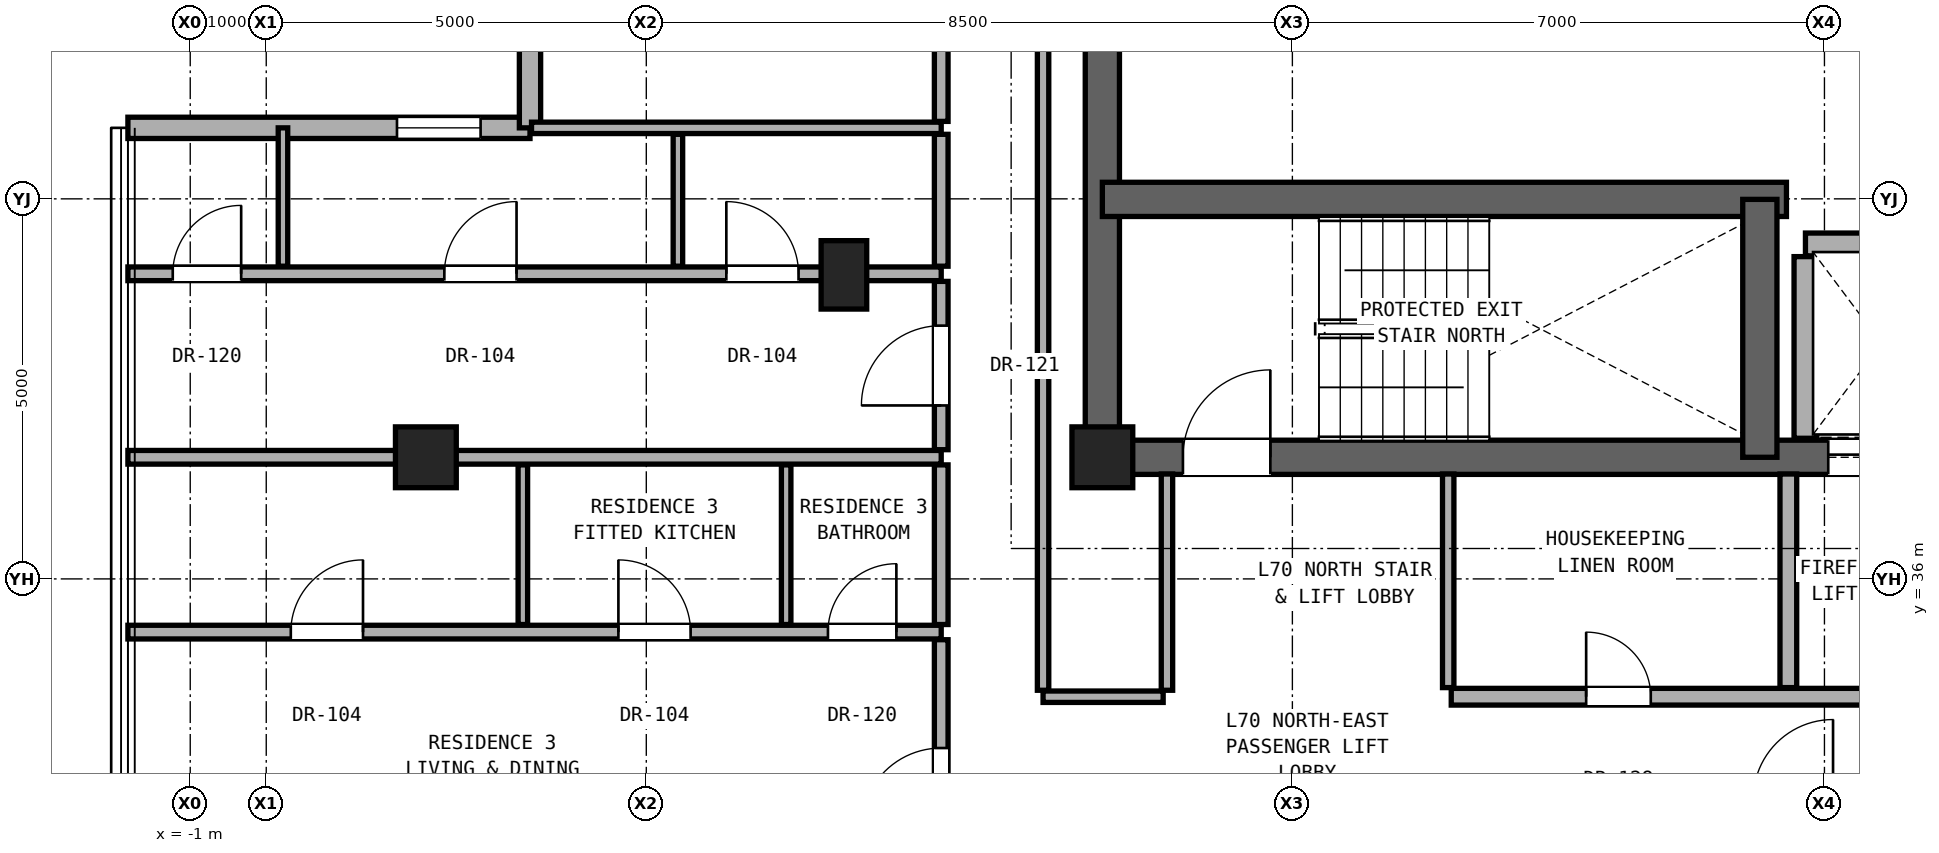
"""IFC4 building model, lengths in metres.
Left out: names, types, materials, properties, quantities, classifications, styles, units other than length and angle.
Written with IfcOpenShell. Run it as: python <this file> out.ifc"""

import sys

from ifc_helpers import new_model, si_unit, direction, frame, frame_2d, origin, origin_2d, place, context, subcontext, project, spatial, rectangle, hollow_rectangle, extrude, element, fill, save


model = new_model("IFC4")
c1 = context("Model", 3, precision=1e-05, world=origin(), true_north=direction((0.0, 1.0)))
c2 = subcontext(c1, "Body", "Model", "MODEL_VIEW")
j1 = project(units=[si_unit("LENGTHUNIT", "METRE"), si_unit("PLANEANGLEUNIT", "RADIAN")], contexts=[c1])
p1 = place(None, origin())
s1 = spatial("IfcSite", under=j1, at=p1, CompositionType="ELEMENT")
p2 = place(p1, origin())
s2 = spatial("IfcBuilding", under=s1, at=p2, CompositionType="ELEMENT")
p3 = place(p2, frame((0.0, 0.0, 245.8)))
s3 = spatial("IfcBuildingStorey", under=s2, at=p3, CompositionType="ELEMENT", Elevation=245.8)
p4 = place(p3, frame((11.0, 37.6, 0.0), z_axis=(0.0, 0.0, 1.0), x_axis=(1.0, 0.0, 0.0)))
e1 = element("IfcColumn", 1, at=p4, inside=s3, PredefinedType="COLUMN", context=c2, shape_type="SweptSolid", body=[
    extrude(rectangle(XDim=0.8, YDim=0.8, at=origin_2d()), origin(), (0.0, 0.0, 1.0), 3.3),
])
p5 = place(p3, frame((2.1, 37.6, 0.0), z_axis=(0.0, 0.0, 1.0), x_axis=(1.0, 0.0, 0.0)))
e2 = element("IfcColumn", 2, at=p5, inside=s3, PredefinedType="COLUMN", context=c2, shape_type="SweptSolid", body=[
    extrude(hollow_rectangle(XDim=0.8, YDim=0.8, WallThickness=0.045, at=origin_2d()), origin(), (0.0, 0.0, 1.0), 3.3),
])
p6 = place(p3, frame((7.6, 40.0, 0.0), z_axis=(0.0, 0.0, 1.0), x_axis=(1.0, 0.0, 0.0)))
e3 = element("IfcColumn", 3, at=p6, inside=s3, PredefinedType="PILASTER", context=c2, shape_type="SweptSolid", body=[
    extrude(rectangle(XDim=0.6, YDim=0.9, at=origin_2d()), origin(), (0.0, 0.0, 1.0), 3.3),
])
p7 = place(p3, frame((11.0, 37.6, 0.0), z_axis=(0.0, 0.0, 1.0), x_axis=(0.0, 1.0, 0.0)))
e4 = element("IfcWall", 4, at=p7, inside=s3, PredefinedType="SHEAR", context=c2, shape_type="SweptSolid", body=[
    extrude(rectangle(XDim=6.0, YDim=0.45, at=frame_2d((3.0, 0.0))), origin(), (0.0, 0.0, 1.0), 3.1),
])
p8 = place(p3, frame((11.0, 37.6, 0.0), z_axis=(0.0, 0.0, 1.0), x_axis=(1.0, 0.0, 0.0)))
e5 = element("IfcWall", 5, at=p8, inside=s3, PredefinedType="SHEAR", context=c2, shape_type="SweptSolid", body=[
    extrude(rectangle(XDim=19.0, YDim=0.45, at=frame_2d((9.5, 0.0))), origin(), (0.0, 0.0, 1.0), 3.1),
])
p9 = place(p8, frame((1.06, 0.0, 0.0)))
e6 = element("IfcOpeningElement", 6, at=p9, cuts=e5, PredefinedType="OPENING", context=c2, shape_type="SweptSolid", body=[
    extrude(rectangle(XDim=1.15, YDim=2.2, at=frame_2d((0.575, 1.1))), frame((0.0, 0.235, 0.0), z_axis=(0.0, -1.0, 0.0), x_axis=(1.0, 0.0, 0.0)), (0.0, 0.0, 1.0), 0.47),
])
p10 = place(p8, frame((9.55, 0.0, 0.0)))
e7 = element("IfcOpeningElement", 7, at=p10, cuts=e5, PredefinedType="OPENING", context=c2, shape_type="SweptSolid", body=[
    extrude(rectangle(XDim=1.4, YDim=2.35, at=frame_2d((0.7, 1.175))), frame((0.0, 0.235, 0.0), z_axis=(0.0, -1.0, 0.0), x_axis=(1.0, 0.0, 0.0)), (0.0, 0.0, 1.0), 0.47),
])
p11 = place(p8, frame((11.95, 0.0, 0.0)))
e8 = element("IfcOpeningElement", 8, at=p11, cuts=e5, PredefinedType="OPENING", context=c2, shape_type="SweptSolid", body=[
    extrude(rectangle(XDim=1.4, YDim=2.35, at=frame_2d((0.7, 1.175))), frame((0.0, 0.235, 0.0), z_axis=(0.0, -1.0, 0.0), x_axis=(1.0, 0.0, 0.0)), (0.0, 0.0, 1.0), 0.47),
])
p12 = place(p3, frame((11.0, 40.993, 0.0), z_axis=(0.0, 0.0, 1.0), x_axis=(1.0, 0.0, 0.0)))
e9 = element("IfcWall", 9, at=p12, inside=s3, PredefinedType="SHEAR", context=c2, shape_type="SweptSolid", body=[
    extrude(rectangle(XDim=9.0, YDim=0.45, at=frame_2d((4.5, 0.0))), origin(), (0.0, 0.0, 1.0), 3.1),
])
p13 = place(p3, frame((19.65, 37.6, 0.0), z_axis=(0.0, 0.0, 1.0), x_axis=(0.0, 1.0, 0.0)))
e10 = element("IfcWall", 10, at=p13, inside=s3, PredefinedType="SHEAR", context=c2, shape_type="SweptSolid", body=[
    extrude(rectangle(XDim=3.393, YDim=0.45, at=frame_2d((1.696, 0.0))), origin(), (0.0, 0.0, 1.0), 3.1),
])
p14 = place(p3, frame((3.47, 41.934, 0.0), z_axis=(0.0, 0.0, 1.0), x_axis=(-1.0, 0.0, 0.0)))
e11 = element("IfcWall", 11, at=p14, inside=s3, PredefinedType="SOLIDWALL", context=c2, shape_type="SweptSolid", body=[
    extrude(rectangle(XDim=5.29, YDim=0.28, at=frame_2d((2.645, 0.0))), origin(), (0.0, 0.0, 1.0), 3.08),
])
p15 = place(p14, frame((0.65, 0.0, 0.85)))
e12 = element("IfcOpeningElement", 12, at=p15, cuts=e11, PredefinedType="OPENING", context=c2, shape_type="SweptSolid", body=[
    extrude(rectangle(XDim=1.1, YDim=2.0, at=frame_2d((0.55, 1.0))), frame((0.0, 0.15, 0.0), z_axis=(0.0, -1.0, 0.0), x_axis=(1.0, 0.0, 0.0)), (0.0, 0.0, 1.0), 0.3),
])
p16 = place(p3, frame((3.47, 47.224, 0.0), z_axis=(0.0, 0.0, 1.0), x_axis=(0.0, -1.0, 0.0)))
e13 = element("IfcWall", 13, at=p16, inside=s3, PredefinedType="SOLIDWALL", context=c2, shape_type="SweptSolid", body=[
    extrude(rectangle(XDim=5.29, YDim=0.28, at=frame_2d((2.645, 0.0))), origin(), (0.0, 0.0, 1.0), 3.08),
])
p17 = place(p3, frame((10.22, 34.45, 0.0), z_axis=(0.0, 0.0, 1.0), x_axis=(1.0, 0.0, 0.0)))
e14 = element("IfcWall", 14, at=p17, inside=s3, PredefinedType="PARTITIONING", context=c2, shape_type="SweptSolid", body=[
    extrude(rectangle(XDim=1.58, YDim=0.15, at=frame_2d((0.79, 0.0))), origin(), (0.0, 0.0, 1.0), 2.236),
])
p18 = place(p3, frame((15.59, 34.45, 0.0), z_axis=(0.0, 0.0, 1.0), x_axis=(1.0, 0.0, 0.0)))
e15 = element("IfcWall", 15, at=p18, inside=s3, PredefinedType="SOLIDWALL", context=c2, shape_type="SweptSolid", body=[
    extrude(rectangle(XDim=15.19, YDim=0.22, at=frame_2d((7.595, 0.0))), origin(), (0.0, 0.0, 1.0), 2.236),
])
p19 = place(p18, frame((6.435, 0.0, 0.0)))
e16 = element("IfcOpeningElement", 16, at=p19, cuts=e15, PredefinedType="OPENING", context=c2, shape_type="SweptSolid", body=[
    extrude(rectangle(XDim=0.85, YDim=2.01, at=frame_2d((0.425, 1.005))), frame((0.0, 0.12, 0.0), z_axis=(0.0, -1.0, 0.0), x_axis=(1.0, 0.0, 0.0)), (0.0, 0.0, 1.0), 0.24),
])
p20 = place(p18, frame((11.085, 0.0, 0.0)))
e17 = element("IfcOpeningElement", 17, at=p20, cuts=e15, PredefinedType="OPENING", context=c2, shape_type="SweptSolid", body=[
    extrude(rectangle(XDim=0.95, YDim=2.15, at=frame_2d((0.475, 1.075))), frame((0.0, 0.12, 0.0), z_axis=(0.0, -1.0, 0.0), x_axis=(1.0, 0.0, 0.0)), (0.0, 0.0, 1.0), 0.24),
])
p21 = place(p18, frame((1.775, 0.0, 0.0)))
e18 = element("IfcOpeningElement", 18, at=p21, cuts=e15, PredefinedType="OPENING", context=c2, shape_type="SweptSolid", body=[
    extrude(rectangle(XDim=0.85, YDim=2.01, at=frame_2d((0.425, 1.005))), frame((0.0, 0.12, 0.0), z_axis=(0.0, -1.0, 0.0), x_axis=(1.0, 0.0, 0.0)), (0.0, 0.0, 1.0), 0.24),
])
p22 = place(p3, frame((-1.82, 35.3, 0.0), z_axis=(0.0, 0.0, 1.0), x_axis=(1.0, 0.0, 0.0)))
e19 = element("IfcWall", 19, at=p22, inside=s3, PredefinedType="PARTITIONING", context=c2, shape_type="SweptSolid", body=[
    extrude(rectangle(XDim=10.7, YDim=0.18, at=frame_2d((5.35, 0.0))), origin(), (0.0, 0.0, 1.0), 2.319),
])
p23 = place(p22, frame((2.143, 0.0, 0.0)))
e20 = element("IfcOpeningElement", 20, at=p23, cuts=e19, PredefinedType="OPENING", context=c2, shape_type="SweptSolid", body=[
    extrude(rectangle(XDim=0.95, YDim=2.15, at=frame_2d((0.475, 1.075))), frame((0.0, 0.1, 0.0), z_axis=(0.0, -1.0, 0.0), x_axis=(1.0, 0.0, 0.0)), (0.0, 0.0, 1.0), 0.2),
])
p24 = place(p22, frame((6.453, 0.0, 0.0)))
e21 = element("IfcOpeningElement", 21, at=p24, cuts=e19, PredefinedType="OPENING", context=c2, shape_type="SweptSolid", body=[
    extrude(rectangle(XDim=0.95, YDim=2.15, at=frame_2d((0.475, 1.075))), frame((0.0, 0.1, 0.0), z_axis=(0.0, -1.0, 0.0), x_axis=(1.0, 0.0, 0.0)), (0.0, 0.0, 1.0), 0.2),
])
p25 = place(p22, frame((9.21, 0.0, 0.0)))
e22 = element("IfcOpeningElement", 22, at=p25, cuts=e19, PredefinedType="OPENING", context=c2, shape_type="SweptSolid", body=[
    extrude(rectangle(XDim=0.9, YDim=2.1, at=frame_2d((0.45, 1.05))), frame((0.0, 0.1, 0.0), z_axis=(0.0, -1.0, 0.0), x_axis=(1.0, 0.0, 0.0)), (0.0, 0.0, 1.0), 0.2),
])
p26 = place(p3, frame((-1.82, 37.6, 0.0), z_axis=(0.0, 0.0, 1.0), x_axis=(1.0, 0.0, 0.0)))
e23 = element("IfcWall", 23, at=p26, inside=s3, PredefinedType="PARTITIONING", context=c2, shape_type="SweptSolid", body=[
    extrude(rectangle(XDim=10.7, YDim=0.18, at=frame_2d((5.35, 0.0))), origin(), (0.0, 0.0, 1.0), 2.319),
])
p27 = place(p3, frame((-1.82, 40.014, 0.0), z_axis=(0.0, 0.0, 1.0), x_axis=(1.0, 0.0, 0.0)))
e24 = element("IfcWall", 24, at=p27, inside=s3, PredefinedType="PARTITIONING", context=c2, shape_type="SweptSolid", body=[
    extrude(rectangle(XDim=10.7, YDim=0.18, at=frame_2d((5.35, 0.0))), origin(), (0.0, 0.0, 1.0), 2.543),
])
p28 = place(p27, frame((4.163, 0.0, 0.0)))
e25 = element("IfcOpeningElement", 25, at=p28, cuts=e24, PredefinedType="OPENING", context=c2, shape_type="SweptSolid", body=[
    extrude(rectangle(XDim=0.95, YDim=2.15, at=frame_2d((0.475, 1.075))), frame((0.0, 0.1, 0.0), z_axis=(0.0, -1.0, 0.0), x_axis=(1.0, 0.0, 0.0)), (0.0, 0.0, 1.0), 0.2),
])
p29 = place(p27, frame((7.873, 0.0, 0.0)))
e26 = element("IfcOpeningElement", 26, at=p29, cuts=e24, PredefinedType="OPENING", context=c2, shape_type="SweptSolid", body=[
    extrude(rectangle(XDim=0.95, YDim=2.15, at=frame_2d((0.475, 1.075))), frame((0.0, 0.1, 0.0), z_axis=(0.0, -1.0, 0.0), x_axis=(1.0, 0.0, 0.0)), (0.0, 0.0, 1.0), 0.2),
])
p30 = place(p27, frame((0.59, 0.0, 0.0)))
e27 = element("IfcOpeningElement", 27, at=p30, cuts=e24, PredefinedType="OPENING", context=c2, shape_type="SweptSolid", body=[
    extrude(rectangle(XDim=0.9, YDim=2.1, at=frame_2d((0.45, 1.05))), frame((0.0, 0.1, 0.0), z_axis=(0.0, -1.0, 0.0), x_axis=(1.0, 0.0, 0.0)), (0.0, 0.0, 1.0), 0.2),
])
p31 = place(p3, frame((20.25, 40.4, 0.0), z_axis=(0.0, 0.0, 1.0), x_axis=(1.0, 0.0, 0.0)))
e28 = element("IfcWall", 28, at=p31, inside=s3, PredefinedType="SOLIDWALL", context=c2, shape_type="SweptSolid", body=[
    extrude(rectangle(XDim=4.4, YDim=0.3, at=frame_2d((2.2, 0.0))), origin(), (0.0, 0.0, 1.0), 3.1),
])
p32 = place(p3, frame((3.49, 41.934, 0.0), z_axis=(0.0, 0.0, 1.0), x_axis=(1.0, 0.0, 0.0)))
e29 = element("IfcWall", 29, at=p32, inside=s3, PredefinedType="PARTITIONING", context=c2, shape_type="SweptSolid", body=[
    extrude(rectangle(XDim=5.39, YDim=0.15, at=frame_2d((2.695, 0.0))), origin(), (0.0, 0.0, 1.0), 3.1),
])
p33 = place(p3, frame((0.22, 40.114, 0.0), z_axis=(0.0, 0.0, 1.0), x_axis=(0.0, 1.0, 0.0)))
e30 = element("IfcWall", 30, at=p33, inside=s3, PredefinedType="PARTITIONING", context=c2, shape_type="SweptSolid", body=[
    extrude(rectangle(XDim=1.82, YDim=0.125, at=frame_2d((0.91, 0.0))), origin(), (0.0, 0.0, 1.0), 3.1),
])
p34 = place(p3, frame((3.376, 35.4, 0.0), z_axis=(0.0, 0.0, 1.0), x_axis=(0.0, 1.0, 0.0)))
e31 = element("IfcWall", 31, at=p34, inside=s3, PredefinedType="PARTITIONING", context=c2, shape_type="SweptSolid", body=[
    extrude(rectangle(XDim=2.1, YDim=0.125, at=frame_2d((1.05, 0.0))), origin(), (0.0, 0.0, 1.0), 2.492),
])
p35 = place(p3, frame((5.416, 40.114, 0.0), z_axis=(0.0, 0.0, 1.0), x_axis=(0.0, 1.0, 0.0)))
e32 = element("IfcWall", 32, at=p35, inside=s3, PredefinedType="PARTITIONING", context=c2, shape_type="SweptSolid", body=[
    extrude(rectangle(XDim=1.735, YDim=0.125, at=frame_2d((0.868, 0.0))), origin(), (0.0, 0.0, 1.0), 3.1),
])
p36 = place(p3, frame((6.84, 35.4, 0.0), z_axis=(0.0, 0.0, 1.0), x_axis=(0.0, 1.0, 0.0)))
e33 = element("IfcWall", 33, at=p36, inside=s3, PredefinedType="PARTITIONING", context=c2, shape_type="SweptSolid", body=[
    extrude(rectangle(XDim=2.1, YDim=0.125, at=frame_2d((1.05, 0.0))), origin(), (0.0, 0.0, 1.0), 2.492),
])
p37 = place(p3, frame((8.88, 31.3, 0.0), z_axis=(0.0, 0.0, 1.0), x_axis=(0.0, 1.0, 0.0)))
e34 = element("IfcWall", 34, at=p37, inside=s3, PredefinedType="PARTITIONING", context=c2, shape_type="SweptSolid", body=[
    extrude(rectangle(XDim=3.9, YDim=0.18, at=frame_2d((1.95, 0.0))), origin(), (0.0, 0.0, 1.0), 2.396),
])
p38 = place(p37, frame((1.425, 0.0, 0.0)))
e35 = element("IfcOpeningElement", 35, at=p38, cuts=e34, PredefinedType="OPENING", context=c2, shape_type="SweptSolid", body=[
    extrude(rectangle(XDim=1.05, YDim=2.2, at=frame_2d((0.525, 1.1))), frame((0.0, 0.1, 0.0), z_axis=(0.0, -1.0, 0.0), x_axis=(1.0, 0.0, 0.0)), (0.0, 0.0, 1.0), 0.2),
])
p39 = place(p3, frame((8.88, 35.4, 0.0), z_axis=(0.0, 0.0, 1.0), x_axis=(0.0, 1.0, 0.0)))
e36 = element("IfcWall", 36, at=p39, inside=s3, PredefinedType="PARTITIONING", context=c2, shape_type="SweptSolid", body=[
    extrude(rectangle(XDim=2.1, YDim=0.18, at=frame_2d((1.05, 0.0))), origin(), (0.0, 0.0, 1.0), 2.492),
])
p40 = place(p3, frame((8.88, 37.7, 0.0), z_axis=(0.0, 0.0, 1.0), x_axis=(0.0, 1.0, 0.0)))
e37 = element("IfcWall", 37, at=p40, inside=s3, PredefinedType="PARTITIONING", context=c2, shape_type="SweptSolid", body=[
    extrude(rectangle(XDim=2.214, YDim=0.18, at=frame_2d((1.107, 0.0))), origin(), (0.0, 0.0, 1.0), 2.492),
])
p41 = place(p40, frame((0.582, 0.0, 0.0)))
e38 = element("IfcOpeningElement", 38, at=p41, cuts=e37, PredefinedType="OPENING", context=c2, shape_type="SweptSolid", body=[
    extrude(rectangle(XDim=1.05, YDim=2.2, at=frame_2d((0.525, 1.1))), frame((0.0, 0.1, 0.0), z_axis=(0.0, -1.0, 0.0), x_axis=(1.0, 0.0, 0.0)), (0.0, 0.0, 1.0), 0.2),
])
p42 = place(p3, frame((8.88, 40.114, 0.0), z_axis=(0.0, 0.0, 1.0), x_axis=(0.0, 1.0, 0.0)))
e39 = element("IfcWall", 39, at=p42, inside=s3, PredefinedType="PARTITIONING", context=c2, shape_type="SweptSolid", body=[
    extrude(rectangle(XDim=1.735, YDim=0.18, at=frame_2d((0.868, 0.0))), origin(), (0.0, 0.0, 1.0), 3.1),
])
p43 = place(p3, frame((8.88, 42.019, 0.0), z_axis=(0.0, 0.0, 1.0), x_axis=(0.0, 1.0, 0.0)))
e40 = element("IfcWall", 40, at=p43, inside=s3, PredefinedType="PARTITIONING", context=c2, shape_type="SweptSolid", body=[
    extrude(rectangle(XDim=5.205, YDim=0.18, at=frame_2d((2.603, 0.0))), origin(), (0.0, 0.0, 1.0), 3.1),
])
p44 = place(p43, frame((2.127, 0.0, 0.0)))
e41 = element("IfcOpeningElement", 41, at=p44, cuts=e40, PredefinedType="OPENING", context=c2, shape_type="SweptSolid", body=[
    extrude(rectangle(XDim=0.95, YDim=2.15, at=frame_2d((0.475, 1.075))), frame((0.0, 0.1, 0.0), z_axis=(0.0, -1.0, 0.0), x_axis=(1.0, 0.0, 0.0)), (0.0, 0.0, 1.0), 0.2),
])
p45 = place(p3, frame((10.22, 34.535, 0.0), z_axis=(0.0, 0.0, 1.0), x_axis=(0.0, 1.0, 0.0)))
e42 = element("IfcWall", 42, at=p45, inside=s3, PredefinedType="PARTITIONING", context=c2, shape_type="SweptSolid", body=[
    extrude(rectangle(XDim=9.13, YDim=0.15, at=frame_2d((4.565, 0.0))), origin(), (0.0, 0.0, 1.0), 2.492),
])
p46 = place(p3, frame((11.85, 34.535, 0.0), z_axis=(0.0, 0.0, 1.0), x_axis=(0.0, 1.0, 0.0)))
e43 = element("IfcWall", 43, at=p46, inside=s3, PredefinedType="PARTITIONING", context=c2, shape_type="SweptSolid", body=[
    extrude(rectangle(XDim=2.845, YDim=0.15, at=frame_2d((1.422, 0.0))), origin(), (0.0, 0.0, 1.0), 3.1),
])
p47 = place(p3, frame((15.55, 34.57, 0.0), z_axis=(0.0, 0.0, 1.0), x_axis=(0.0, 1.0, 0.0)))
e44 = element("IfcWall", 44, at=p47, inside=s3, PredefinedType="PARTITIONING", context=c2, shape_type="SweptSolid", body=[
    extrude(rectangle(XDim=2.81, YDim=0.15, at=frame_2d((1.405, 0.0))), origin(), (0.0, 0.0, 1.0), 3.1),
])
p48 = place(p3, frame((20.025, 34.57, 0.0), z_axis=(0.0, 0.0, 1.0), x_axis=(0.0, 1.0, 0.0)))
e45 = element("IfcWall", 45, at=p48, inside=s3, PredefinedType="SOLIDWALL", context=c2, shape_type="SweptSolid", body=[
    extrude(rectangle(XDim=2.81, YDim=0.22, at=frame_2d((1.405, 0.0))), origin(), (0.0, 0.0, 1.0), 3.1),
])
p49 = place(p3, frame((20.25, 37.85, 0.0), z_axis=(0.0, 0.0, 1.0), x_axis=(0.0, 1.0, 0.0)))
e46 = element("IfcWall", 46, at=p49, inside=s3, PredefinedType="SOLIDWALL", context=c2, shape_type="SweptSolid", body=[
    extrude(rectangle(XDim=2.39, YDim=0.3, at=frame_2d((1.195, 0.0))), origin(), (0.0, 0.0, 1.0), 3.1),
])
p50 = place(p15, origin())
e47 = element("IfcWindow", 47, at=p50, inside=s3, PartitioningType="SINGLE_PANEL", PredefinedType="WINDOW", context=c2, shape_type="SweptSolid", body=[
    extrude(rectangle(XDim=1.1, YDim=2.0, at=frame_2d((0.55, 1.0))), frame((0.0, 0.03, 0.0), z_axis=(0.0, -1.0, 0.0), x_axis=(1.0, 0.0, 0.0)), (0.0, 0.0, 1.0), 0.06),
])
fill(e12, e47)
p51 = place(p9, origin())
e48 = element("IfcDoor", 48, at=p51, inside=s3, OperationType="SINGLE_SWING_RIGHT", PredefinedType="DOOR", context=c2, shape_type="SweptSolid", body=[
    extrude(rectangle(XDim=1.15, YDim=2.2, at=frame_2d((0.575, 1.1))), frame((0.0, 0.025, 0.0), z_axis=(0.0, -1.0, 0.0), x_axis=(1.0, 0.0, 0.0)), (0.0, 0.0, 1.0), 0.05),
])
fill(e6, e48)
p52 = place(p21, origin())
e49 = element("IfcDoor", 49, at=p52, inside=s3, OperationType="SINGLE_SWING_LEFT", PredefinedType="DOOR", context=c2, shape_type="SweptSolid", body=[
    extrude(rectangle(XDim=0.85, YDim=2.01, at=frame_2d((0.425, 1.005))), frame((0.0, 0.025, 0.0), z_axis=(0.0, -1.0, 0.0), x_axis=(1.0, 0.0, 0.0)), (0.0, 0.0, 1.0), 0.05),
])
fill(e18, e49)
p53 = place(p38, origin())
e50 = element("IfcDoor", 50, at=p53, inside=s3, OperationType="SINGLE_SWING_LEFT", PredefinedType="DOOR", context=c2, shape_type="SweptSolid", body=[
    extrude(rectangle(XDim=1.05, YDim=2.2, at=frame_2d((0.525, 1.1))), frame((0.0, 0.025, 0.0), z_axis=(0.0, -1.0, 0.0), x_axis=(1.0, 0.0, 0.0)), (0.0, 0.0, 1.0), 0.05),
])
fill(e35, e50)
p54 = place(p23, origin())
e51 = element("IfcDoor", 51, at=p54, inside=s3, OperationType="SINGLE_SWING_RIGHT", PredefinedType="DOOR", context=c2, shape_type="SweptSolid", body=[
    extrude(rectangle(XDim=0.95, YDim=2.15, at=frame_2d((0.475, 1.075))), frame((0.0, 0.025, 0.0), z_axis=(0.0, -1.0, 0.0), x_axis=(1.0, 0.0, 0.0)), (0.0, 0.0, 1.0), 0.05),
])
fill(e20, e51)
p55 = place(p24, origin())
e52 = element("IfcDoor", 52, at=p55, inside=s3, OperationType="SINGLE_SWING_LEFT", PredefinedType="DOOR", context=c2, shape_type="SweptSolid", body=[
    extrude(rectangle(XDim=0.95, YDim=2.15, at=frame_2d((0.475, 1.075))), frame((0.0, 0.025, 0.0), z_axis=(0.0, -1.0, 0.0), x_axis=(1.0, 0.0, 0.0)), (0.0, 0.0, 1.0), 0.05),
])
fill(e21, e52)
p56 = place(p25, origin())
e53 = element("IfcDoor", 53, at=p56, inside=s3, OperationType="SINGLE_SWING_RIGHT", PredefinedType="DOOR", context=c2, shape_type="SweptSolid", body=[
    extrude(rectangle(XDim=0.9, YDim=2.1, at=frame_2d((0.45, 1.05))), frame((0.0, 0.025, 0.0), z_axis=(0.0, -1.0, 0.0), x_axis=(1.0, 0.0, 0.0)), (0.0, 0.0, 1.0), 0.05),
])
fill(e22, e53)
p57 = place(p41, origin())
e54 = element("IfcDoor", 54, at=p57, inside=s3, OperationType="SINGLE_SWING_LEFT", PredefinedType="DOOR", context=c2, shape_type="SweptSolid", body=[
    extrude(rectangle(XDim=1.05, YDim=2.2, at=frame_2d((0.525, 1.1))), frame((0.0, 0.025, 0.0), z_axis=(0.0, -1.0, 0.0), x_axis=(1.0, 0.0, 0.0)), (0.0, 0.0, 1.0), 0.05),
])
fill(e38, e54)
p58 = place(p28, origin())
e55 = element("IfcDoor", 55, at=p58, inside=s3, OperationType="SINGLE_SWING_RIGHT", PredefinedType="DOOR", context=c2, shape_type="SweptSolid", body=[
    extrude(rectangle(XDim=0.95, YDim=2.15, at=frame_2d((0.475, 1.075))), frame((0.0, 0.025, 0.0), z_axis=(0.0, -1.0, 0.0), x_axis=(1.0, 0.0, 0.0)), (0.0, 0.0, 1.0), 0.05),
])
fill(e25, e55)
p59 = place(p29, origin())
e56 = element("IfcDoor", 56, at=p59, inside=s3, OperationType="SINGLE_SWING_LEFT", PredefinedType="DOOR", context=c2, shape_type="SweptSolid", body=[
    extrude(rectangle(XDim=0.95, YDim=2.15, at=frame_2d((0.475, 1.075))), frame((0.0, 0.025, 0.0), z_axis=(0.0, -1.0, 0.0), x_axis=(1.0, 0.0, 0.0)), (0.0, 0.0, 1.0), 0.05),
])
fill(e26, e56)
p60 = place(p30, origin())
e57 = element("IfcDoor", 57, at=p60, inside=s3, OperationType="SINGLE_SWING_RIGHT", PredefinedType="DOOR", context=c2, shape_type="SweptSolid", body=[
    extrude(rectangle(XDim=0.9, YDim=2.1, at=frame_2d((0.45, 1.05))), frame((0.0, 0.025, 0.0), z_axis=(0.0, -1.0, 0.0), x_axis=(1.0, 0.0, 0.0)), (0.0, 0.0, 1.0), 0.05),
])
fill(e27, e57)
p61 = place(p10, origin())
e58 = element("IfcDoor", 58, at=p61, inside=s3, OperationType="DOUBLE_DOOR_SLIDING", PredefinedType="DOOR", context=c2, shape_type="SweptSolid", body=[
    extrude(rectangle(XDim=1.4, YDim=2.35, at=frame_2d((0.7, 1.175))), frame((0.0, 0.025, 0.0), z_axis=(0.0, -1.0, 0.0), x_axis=(1.0, 0.0, 0.0)), (0.0, 0.0, 1.0), 0.05),
])
fill(e7, e58)
save(model, sys.argv[1])
